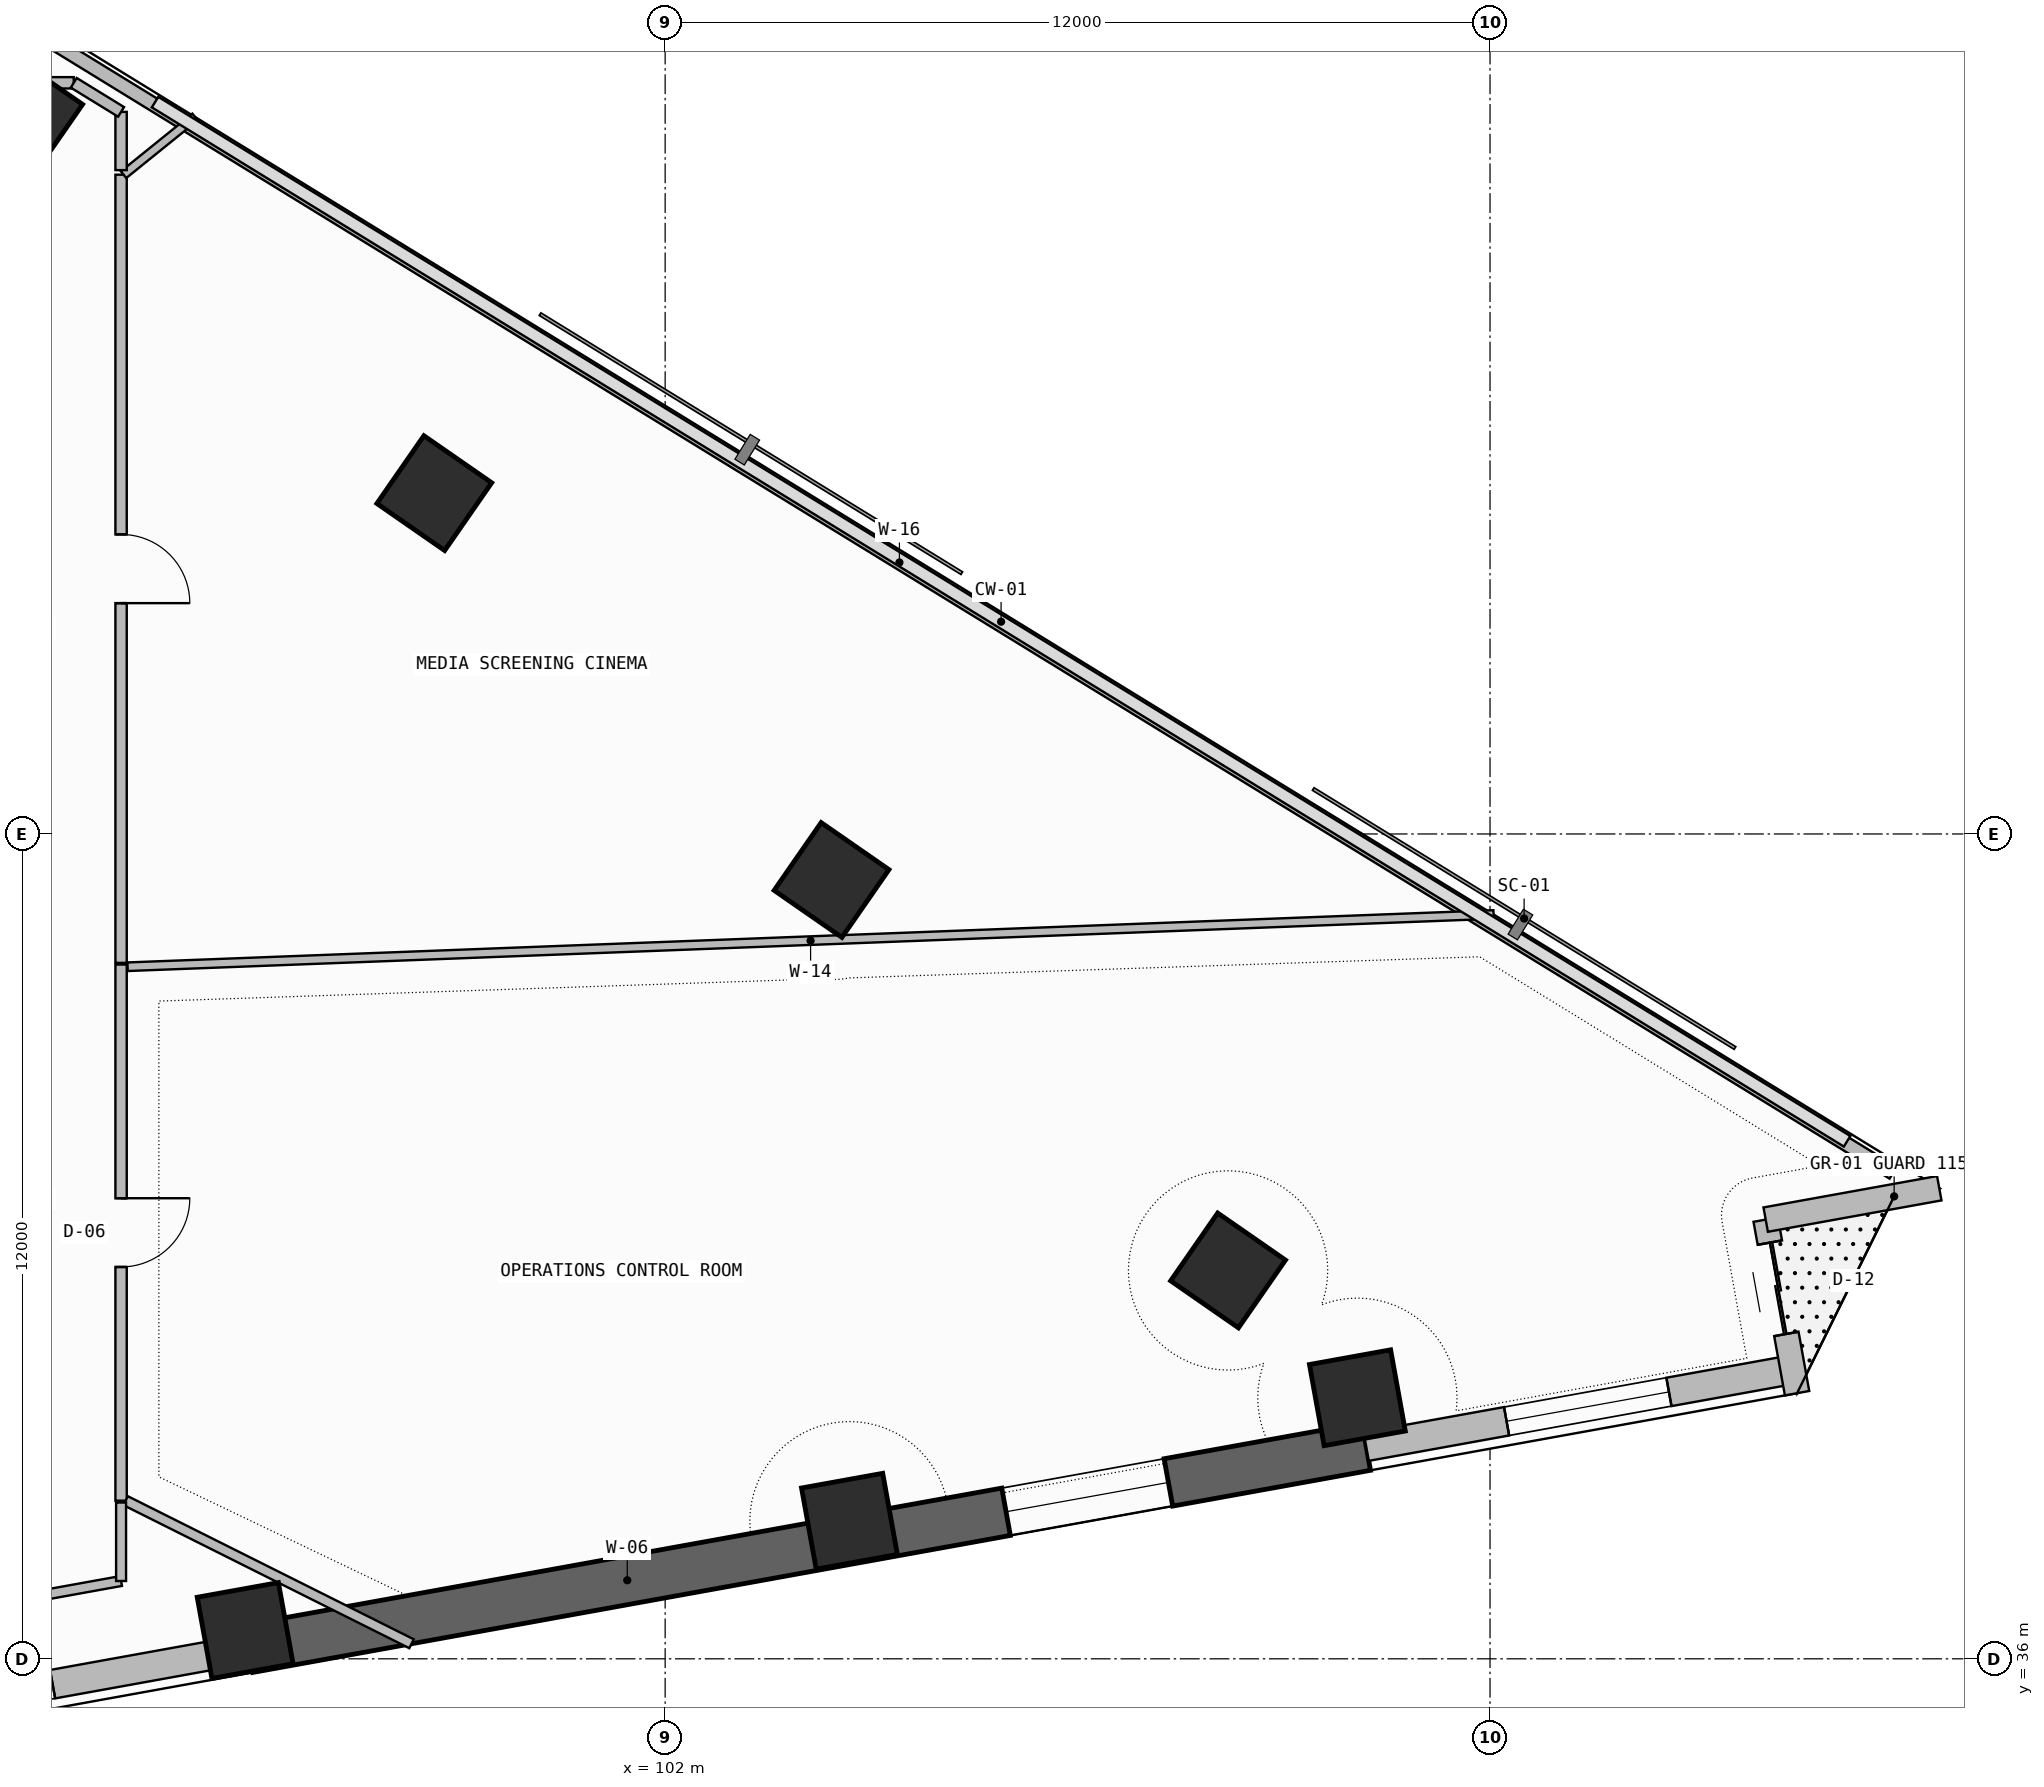
"""IFC4 building model, lengths in metres.
Left out: names, types, materials, properties, quantities, classifications, styles, units other than length and angle.
Written with IfcOpenShell. Run it as: python <this file> out.ifc"""

import sys

from ifc_helpers import new_model, si_unit, direction, frame, frame_2d, origin, origin_2d, place, context, subcontext, project, spatial, rectangle, extrude, element, fill, save


model = new_model("IFC4")
c1 = context("Model", 3, precision=1e-05, world=origin(), true_north=direction((0.0, 1.0)))
c2 = subcontext(c1, "Body", "Model", "MODEL_VIEW")
j1 = project(units=[si_unit("LENGTHUNIT", "METRE"), si_unit("PLANEANGLEUNIT", "RADIAN")], contexts=[c1])
p1 = place(None, origin())
s1 = spatial("IfcSite", under=j1, at=p1, CompositionType="ELEMENT")
p2 = place(p1, origin())
s2 = spatial("IfcBuilding", under=s1, at=p2, CompositionType="ELEMENT")
p3 = place(p2, frame((0.0, 0.0, 113.7)))
s3 = spatial("IfcBuildingStorey", under=s2, at=p3, CompositionType="ELEMENT", Elevation=113.7)
for number, where, z_axis, x_axis in (
    (1, (95.89, 36.412, 0.0), (0.0, 0.0, 1.0), (0.984, 0.178, 0.0)),
    (2, (104.681, 38.001, 0.0), (0.0, 0.0, 1.0), (0.984, 0.178, 0.0)),
    (3, (112.07, 39.798, 0.0), (0.0, 0.0, 1.0), (0.984, 0.178, 0.0)),
    (4, (110.189, 41.65, 0.0), (0.0, 0.0, 1.0), (0.57, 0.822, 0.0)),
    (5, (104.42, 47.331, 0.0), (0.0, 0.0, 1.0), (0.57, 0.822, 0.0)),
    (6, (98.641, 52.958, 0.0), (0.0, 0.0, 1.0), (0.57, 0.822, 0.0)),
    (7, (92.69, 58.463, 0.0), (0.0, 0.0, 1.0), (0.57, 0.822, 0.0)),
):
    element("IfcColumn", number, at=place(p3, frame(where, z_axis=z_axis, x_axis=x_axis)), inside=s3, PredefinedType="COLUMN", context=c2, shape_type="SweptSolid", body=[
        extrude(rectangle(XDim=1.2, YDim=1.2, at=origin_2d()), origin(), (0.0, 0.0, 1.0), 3.6),
    ])
p4 = place(p3, frame((86.1, 34.367, 0.0), z_axis=(0.0, 0.0, 1.0), x_axis=(0.9840437071, 0.177926902172, 0.0)))
e8 = element("IfcWall", 8, at=p4, inside=s3, PredefinedType="SOLIDWALL", context=c2, shape_type="SweptSolid", body=[
    extrude(rectangle(XDim=9.997, YDim=0.42, at=frame_2d((4.999, 0.0))), origin(), (0.0, 0.0, 1.0), 2.325),
])
p5 = place(p4, frame((4.702, 0.0, 1.2)))
e9 = element("IfcOpeningElement", 9, at=p5, cuts=e8, PredefinedType="OPENING", context=c2, shape_type="SweptSolid", body=[
    extrude(rectangle(XDim=2.4, YDim=0.9, at=frame_2d((1.2, 0.45))), frame((0.0, 0.22, 0.0), z_axis=(0.0, -1.0, 0.0), x_axis=(1.0, 0.0, 0.0)), (0.0, 0.0, 1.0), 0.44),
])
p6 = place(p3, frame((95.938, 36.146, -0.26), z_axis=(0.0, 0.0, 1.0), x_axis=(0.984038488288, 0.177955762952, 0.0)))
e10 = element("IfcWall", 10, at=p6, inside=s3, PredefinedType="SHEAR", context=c2, shape_type="SweptSolid", body=[
    extrude(rectangle(XDim=16.525, YDim=0.7, at=frame_2d((8.262, 0.0))), origin(), (0.0, 0.0, 1.0), 3.6),
])
p7 = place(p6, frame((11.2, 0.0, 1.2)))
e11 = element("IfcOpeningElement", 11, at=p7, cuts=e10, PredefinedType="OPENING", context=c2, shape_type="SweptSolid", body=[
    extrude(rectangle(XDim=2.4, YDim=0.9, at=frame_2d((1.2, 0.45))), frame((0.0, 0.36, 0.0), z_axis=(0.0, -1.0, 0.0), x_axis=(1.0, 0.0, 0.0)), (0.0, 0.0, 1.0), 0.72),
])
p8 = place(p3, frame((112.199, 39.087, 0.0), z_axis=(0.0, 0.0, 1.0), x_axis=(0.984042888215, 0.177931431042, 0.0)))
e12 = element("IfcWall", 12, at=p8, inside=s3, PredefinedType="SOLIDWALL", context=c2, shape_type="SweptSolid", body=[
    extrude(rectangle(XDim=6.306, YDim=0.42, at=frame_2d((3.153, 0.0))), origin(), (0.0, 0.0, 1.0), 3.34),
])
p9 = place(p8, frame((2.075, 0.0, 1.2)))
e13 = element("IfcOpeningElement", 13, at=p9, cuts=e12, PredefinedType="OPENING", context=c2, shape_type="SweptSolid", body=[
    extrude(rectangle(XDim=2.4, YDim=0.9, at=frame_2d((1.2, 0.45))), frame((0.0, 0.22, 0.0), z_axis=(0.0, -1.0, 0.0), x_axis=(1.0, 0.0, 0.0)), (0.0, 0.0, 1.0), 0.44),
])
p10 = place(p3, frame((118.467, 39.864, 0.0), z_axis=(0.0, 0.0, 1.0), x_axis=(-0.177897493713, 0.984049024048, 0.0)))
e14 = element("IfcWall", 14, at=p10, inside=s3, PredefinedType="SOLIDWALL", context=c2, shape_type="SweptSolid", body=[
    extrude(rectangle(XDim=2.566, YDim=0.36, at=frame_2d((1.283, 0.0))), origin(), (0.0, 0.0, 1.0), 3.34),
])
p11 = place(p10, frame((0.876, 0.0, 0.0)))
e15 = element("IfcOpeningElement", 15, at=p11, cuts=e14, PredefinedType="OPENING", context=c2, shape_type="SweptSolid", body=[
    extrude(rectangle(XDim=1.35, YDim=2.35, at=frame_2d((0.675, 1.175))), frame((0.0, 0.19, 0.0), z_axis=(0.0, -1.0, 0.0), x_axis=(1.0, 0.0, 0.0)), (0.0, 0.0, 1.0), 0.38),
])
p12 = place(p3, frame((118.01, 42.39, 0.0), z_axis=(0.0, 0.0, 1.0), x_axis=(0.984046012923, 0.177914149102, 0.0)))
e16 = element("IfcWall", 16, at=p12, inside=s3, PredefinedType="SOLIDWALL", context=c2, shape_type="SweptSolid", body=[
    extrude(rectangle(XDim=2.566, YDim=0.36, at=frame_2d((1.283, 0.0))), origin(), (0.0, 0.0, 1.0), 3.34),
])
p13 = place(p3, frame((119.865, 43.07, 0.0), z_axis=(0.0, 0.0, 1.0), x_axis=(-0.852110824326, 0.52336138859, 0.0)))
e17 = element("IfcWall", 17, at=p13, inside=s3, PredefinedType="PARAPET", context=c2, shape_type="SweptSolid", body=[
    extrude(rectangle(XDim=33.932, YDim=0.2, at=frame_2d((16.966, 0.0))), origin(), (0.0, 0.0, 1.0), 1.15),
])
p14 = place(p3, frame((94.085, 38.301, 0.0), z_axis=(0.0, 0.0, 1.0), x_axis=(0.0, 1.0, 0.0)))
e18 = element("IfcWall", 18, at=p14, inside=s3, PredefinedType="PARTITIONING", context=c2, shape_type="SweptSolid", body=[
    extrude(rectangle(XDim=7.8, YDim=0.165, at=frame_2d((3.9, 0.0))), origin(), (0.0, 0.0, 1.0), 2.725),
])
p15 = place(p14, frame((3.4, 0.0, 0.0)))
e19 = element("IfcOpeningElement", 19, at=p15, cuts=e18, PredefinedType="OPENING", context=c2, shape_type="SweptSolid", body=[
    extrude(rectangle(XDim=1.0, YDim=2.2, at=frame_2d((0.5, 1.1))), frame((0.0, 0.093, 0.0), z_axis=(0.0, -1.0, 0.0), x_axis=(1.0, 0.0, 0.0)), (0.0, 0.0, 1.0), 0.185),
])
p16 = place(p3, frame((98.31, 36.219, 0.0), z_axis=(0.0, 0.0, 1.0), x_axis=(-0.89428014348, 0.447507569744, 0.0)))
e20 = element("IfcWall", 20, at=p16, inside=s3, PredefinedType="PARTITIONING", context=c2, shape_type="SweptSolid", body=[
    extrude(rectangle(XDim=4.65, YDim=0.145, at=frame_2d((2.325, 0.0))), origin(), (0.0, 0.0, 1.0), 2.325),
])
p17 = place(p3, frame((94.179, 46.069, 0.0), z_axis=(0.0, 0.0, 1.0), x_axis=(0.999269961217, 0.038203986822, 0.0)))
e21 = element("IfcWall", 21, at=p17, inside=s3, PredefinedType="PARTITIONING", context=c2, shape_type="SweptSolid", body=[
    extrude(rectangle(XDim=19.887, YDim=0.125, at=frame_2d((9.943, 0.0))), origin(), (0.0, 0.0, 1.0), 2.725),
])
p18 = place(p3, frame((92.07, 36.768, 0.0), z_axis=(0.0, 0.0, 1.0), x_axis=(0.984035419871, 0.177972729481, 0.0)))
e22 = element("IfcWall", 22, at=p18, inside=s3, PredefinedType="PARTITIONING", context=c2, shape_type="SweptSolid", body=[
    extrude(rectangle(XDim=2.048, YDim=0.145, at=frame_2d((1.024, 0.0))), origin(), (0.0, 0.0, 1.0), 3.34),
])
p19 = place(p3, frame((94.085, 37.132, 0.0), z_axis=(0.0, 0.0, 1.0), x_axis=(0.0, 1.0, 0.0)))
e23 = element("IfcWall", 23, at=p19, inside=s3, PredefinedType="PARTITIONING", context=c2, shape_type="SweptSolid", body=[
    extrude(rectangle(XDim=1.142, YDim=0.145, at=frame_2d((0.571, 0.0))), origin(), (0.0, 0.0, 1.0), 3.34),
])
p20 = place(p3, frame((94.085, 46.125, 0.0), z_axis=(0.0, 0.0, 1.0), x_axis=(0.0, 1.0, 0.0)))
e24 = element("IfcWall", 24, at=p20, inside=s3, PredefinedType="PARTITIONING", context=c2, shape_type="SweptSolid", body=[
    extrude(rectangle(XDim=11.467, YDim=0.165, at=frame_2d((5.733, 0.0))), origin(), (0.0, 0.0, 1.0), 2.725),
])
p21 = place(p20, frame((5.233, 0.0, 0.0)))
e25 = element("IfcOpeningElement", 25, at=p21, cuts=e24, PredefinedType="OPENING", context=c2, shape_type="SweptSolid", body=[
    extrude(rectangle(XDim=1.0, YDim=2.2, at=frame_2d((0.5, 1.1))), frame((0.0, 0.093, 0.0), z_axis=(0.0, -1.0, 0.0), x_axis=(1.0, 0.0, 0.0)), (0.0, 0.0, 1.0), 0.185),
])
p22 = place(p3, frame((94.122, 57.591, 0.0), z_axis=(0.0, 0.0, 1.0), x_axis=(0.777954919643, 0.628320095973, 0.0)))
e26 = element("IfcWall", 26, at=p22, inside=s3, PredefinedType="PARTITIONING", context=c2, shape_type="SweptSolid", body=[
    extrude(rectangle(XDim=1.336, YDim=0.125, at=frame_2d((0.668, 0.0))), origin(), (0.0, 0.0, 1.0), 3.34),
])
p23 = place(p3, frame((93.396, 58.928, 0.0), z_axis=(0.0, 0.0, 1.0), x_axis=(-1.0, 0.0, 0.0)))
e27 = element("IfcWall", 27, at=p23, inside=s3, PredefinedType="PARTITIONING", context=c2, shape_type="SweptSolid", body=[
    extrude(rectangle(XDim=18.1, YDim=0.165, at=frame_2d((9.05, 0.0))), origin(), (0.0, 0.0, 1.0), 2.725),
])
p24 = place(p23, frame((3.874, 0.0, 0.0)))
e28 = element("IfcOpeningElement", 28, at=p24, cuts=e27, PredefinedType="OPENING", context=c2, shape_type="SweptSolid", body=[
    extrude(rectangle(XDim=1.0, YDim=2.2, at=frame_2d((0.5, 1.1))), frame((0.0, 0.093, 0.0), z_axis=(0.0, -1.0, 0.0), x_axis=(1.0, 0.0, 0.0)), (0.0, 0.0, 1.0), 0.185),
])
p25 = place(p3, frame((94.085, 57.658, 0.0), z_axis=(0.0, 0.0, 1.0), x_axis=(0.0, 1.0, 0.0)))
e29 = element("IfcWall", 29, at=p25, inside=s3, PredefinedType="PARTITIONING", context=c2, shape_type="SweptSolid", body=[
    extrude(rectangle(XDim=0.847, YDim=0.165, at=frame_2d((0.424, 0.0))), origin(), (0.0, 0.0, 1.0), 3.34),
])
p26 = place(p3, frame((94.085, 58.505, 0.0), z_axis=(0.0, 0.0, 1.0), x_axis=(-0.852062515162, 0.523440035014, 0.0)))
e30 = element("IfcWall", 30, at=p26, inside=s3, PredefinedType="PARTITIONING", context=c2, shape_type="SweptSolid", body=[
    extrude(rectangle(XDim=0.808, YDim=0.165, at=frame_2d((0.404, 0.0))), origin(), (0.0, 0.0, 1.0), 3.34),
])
p27 = place(p5, origin())
e31 = element("IfcWindow", 31, at=p27, inside=s3, PartitioningType="SINGLE_PANEL", PredefinedType="WINDOW", context=c2, shape_type="SweptSolid", body=[
    extrude(rectangle(XDim=2.4, YDim=0.9, at=frame_2d((1.2, 0.45))), frame((0.0, 0.03, 0.0), z_axis=(0.0, -1.0, 0.0), x_axis=(1.0, 0.0, 0.0)), (0.0, 0.0, 1.0), 0.06),
])
fill(e9, e31)
p28 = place(p7, origin())
e32 = element("IfcWindow", 32, at=p28, inside=s3, PartitioningType="SINGLE_PANEL", PredefinedType="WINDOW", context=c2, shape_type="SweptSolid", body=[
    extrude(rectangle(XDim=2.4, YDim=0.9, at=frame_2d((1.2, 0.45))), frame((0.0, 0.03, 0.0), z_axis=(0.0, -1.0, 0.0), x_axis=(1.0, 0.0, 0.0)), (0.0, 0.0, 1.0), 0.06),
])
fill(e11, e32)
p29 = place(p9, origin())
e33 = element("IfcWindow", 33, at=p29, inside=s3, PartitioningType="SINGLE_PANEL", PredefinedType="WINDOW", context=c2, shape_type="SweptSolid", body=[
    extrude(rectangle(XDim=2.4, YDim=0.9, at=frame_2d((1.2, 0.45))), frame((0.0, 0.03, 0.0), z_axis=(0.0, -1.0, 0.0), x_axis=(1.0, 0.0, 0.0)), (0.0, 0.0, 1.0), 0.06),
])
fill(e13, e33)
p30 = place(p11, origin())
e34 = element("IfcDoor", 34, at=p30, inside=s3, OperationType="DOUBLE_DOOR_SLIDING", PredefinedType="DOOR", context=c2, shape_type="SweptSolid", body=[
    extrude(rectangle(XDim=1.35, YDim=2.35, at=frame_2d((0.675, 1.175))), frame((0.0, 0.025, 0.0), z_axis=(0.0, -1.0, 0.0), x_axis=(1.0, 0.0, 0.0)), (0.0, 0.0, 1.0), 0.05),
])
fill(e15, e34)
p31 = place(p15, frame((1.0, 0.0, 0.0), z_axis=(0.0, 0.0, 1.0), x_axis=(-1.0, 0.0, 0.0)))
e35 = element("IfcDoor", 35, at=p31, inside=s3, OperationType="SINGLE_SWING_LEFT", PredefinedType="DOOR", context=c2, shape_type="SweptSolid", body=[
    extrude(rectangle(XDim=1.0, YDim=2.2, at=frame_2d((0.5, 1.1))), frame((0.0, 0.025, 0.0), z_axis=(0.0, -1.0, 0.0), x_axis=(1.0, 0.0, 0.0)), (0.0, 0.0, 1.0), 0.05),
])
fill(e19, e35)
p32 = place(p21, frame((1.0, 0.0, 0.0), z_axis=(0.0, 0.0, 1.0), x_axis=(-1.0, 0.0, 0.0)))
e36 = element("IfcDoor", 36, at=p32, inside=s3, OperationType="SINGLE_SWING_RIGHT", PredefinedType="DOOR", context=c2, shape_type="SweptSolid", body=[
    extrude(rectangle(XDim=1.0, YDim=2.2, at=frame_2d((0.5, 1.1))), frame((0.0, 0.025, 0.0), z_axis=(0.0, -1.0, 0.0), x_axis=(1.0, 0.0, 0.0)), (0.0, 0.0, 1.0), 0.05),
])
fill(e25, e36)
save(model, sys.argv[1])
